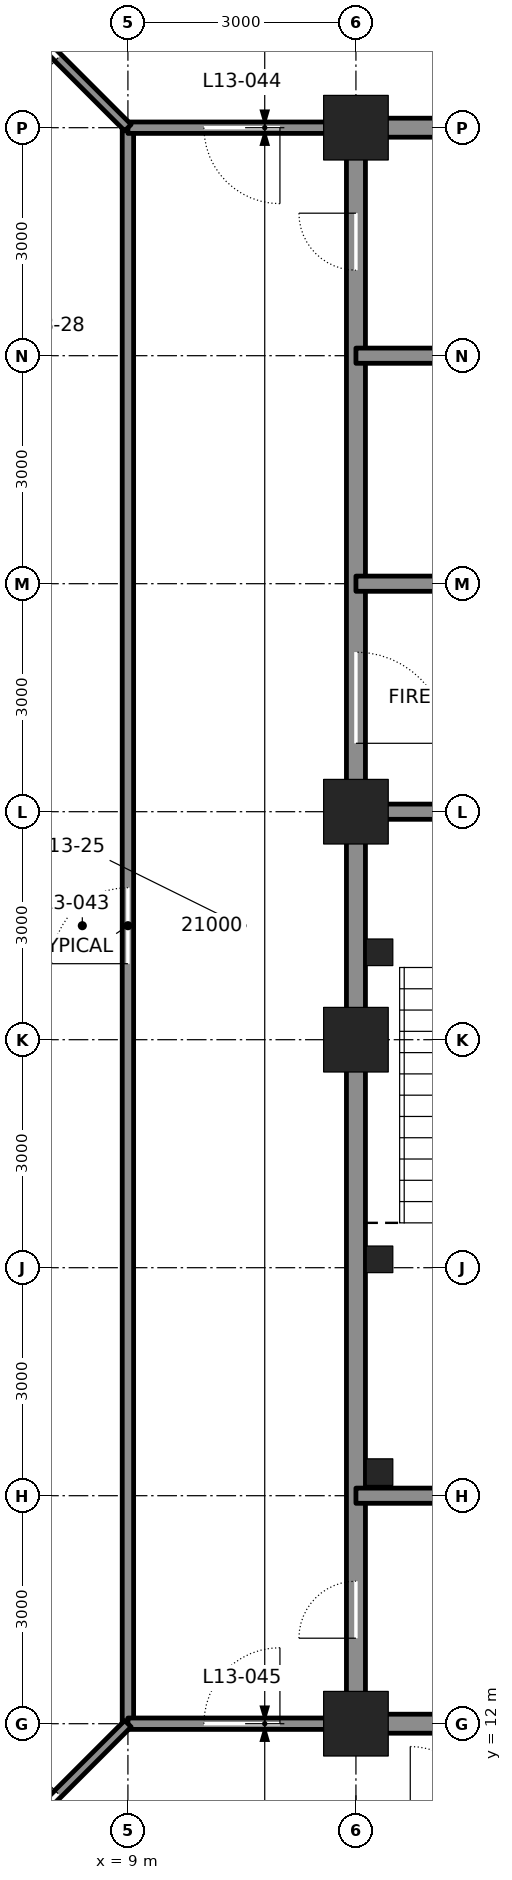
"""IFC4 building model, lengths in metres.
Left out: names, types, materials, properties, quantities, classifications, styles, units other than length and angle.
Written with IfcOpenShell. Run it as: python <this file> out.ifc"""

import sys

from ifc_helpers import new_model, si_unit, direction, frame, frame_2d, origin, origin_2d, place, context, subcontext, project, spatial, rectangle, hollow_rectangle, extrude, element, fill, save


model = new_model("IFC4")
c1 = context("Model", 3, precision=1e-05, world=origin(), true_north=direction((0.0, 1.0)))
c2 = subcontext(c1, "Body", "Model", "MODEL_VIEW")
j1 = project(units=[si_unit("LENGTHUNIT", "METRE"), si_unit("PLANEANGLEUNIT", "RADIAN")], contexts=[c1])
p1 = place(None, origin())
s1 = spatial("IfcSite", under=j1, at=p1, CompositionType="ELEMENT")
p2 = place(p1, origin())
s2 = spatial("IfcBuilding", under=s1, at=p2, CompositionType="ELEMENT")
p3 = place(p2, frame((0.0, 0.0, 64.8)))
s3 = spatial("IfcBuildingStorey", under=s2, at=p3, CompositionType="ELEMENT", Elevation=64.8)
for number, where, z_axis, x_axis in (
    (1, (12.0, 12.0, 0.0), (0.0, 0.0, 1.0), (1.0, 0.0, 0.0)),
    (2, (12.0, 33.0, 0.0), (0.0, 0.0, 1.0), (1.0, 0.0, 0.0)),
    (3, (12.0, 21.0, 0.0), (0.0, 0.0, 1.0), (1.0, 0.0, 0.0)),
    (4, (12.0, 24.0, 0.0), (0.0, 0.0, 1.0), (1.0, 0.0, 0.0)),
):
    element("IfcColumn", number, at=place(p3, frame(where, z_axis=z_axis, x_axis=x_axis)), inside=s3, PredefinedType="COLUMN", context=c2, shape_type="SweptSolid", body=[
        extrude(hollow_rectangle(XDim=0.85, YDim=0.85, WallThickness=0.085, at=origin_2d()), origin(), (0.0, 0.0, 1.0), 4.5),
    ])
p4 = place(p3, frame((12.0, 12.25, 0.0), z_axis=(0.0, 0.0, 1.0), x_axis=(0.0, 1.0, 0.0)))
e5 = element("IfcWall", 5, at=p4, inside=s3, PredefinedType="SOLIDWALL", context=c2, shape_type="SweptSolid", body=[
    extrude(rectangle(XDim=8.5, YDim=0.25, at=frame_2d((4.25, 0.0))), origin(), (0.0, 0.0, 1.0), 3.113),
])
p5 = place(p4, frame((0.875, 0.0, 0.0)))
e6 = element("IfcOpeningElement", 6, at=p5, cuts=e5, PredefinedType="OPENING", context=c2, shape_type="SweptSolid", body=[
    extrude(rectangle(XDim=0.75, YDim=2.1, at=frame_2d((0.375, 1.05))), frame((0.0, 0.135, 0.0), z_axis=(0.0, -1.0, 0.0), x_axis=(1.0, 0.0, 0.0)), (0.0, 0.0, 1.0), 0.27),
])
p6 = place(p3, frame((12.0, 21.25, 0.0), z_axis=(0.0, 0.0, 1.0), x_axis=(0.0, 1.0, 0.0)))
e7 = element("IfcWall", 7, at=p6, inside=s3, PredefinedType="SOLIDWALL", context=c2, shape_type="SweptSolid", body=[
    extrude(rectangle(XDim=2.5, YDim=0.25, at=frame_2d((1.25, 0.0))), origin(), (0.0, 0.0, 1.0), 3.113),
])
p7 = place(p3, frame((12.0, 24.25, 0.0), z_axis=(0.0, 0.0, 1.0), x_axis=(0.0, 1.0, 0.0)))
e8 = element("IfcWall", 8, at=p7, inside=s3, PredefinedType="SOLIDWALL", context=c2, shape_type="SweptSolid", body=[
    extrude(rectangle(XDim=8.5, YDim=0.25, at=frame_2d((4.25, 0.0))), origin(), (0.0, 0.0, 1.0), 3.113),
])
p8 = place(p7, frame((0.65, 0.0, 0.0)))
e9 = element("IfcOpeningElement", 9, at=p8, cuts=e8, PredefinedType="OPENING", context=c2, shape_type="SweptSolid", body=[
    extrude(rectangle(XDim=1.2, YDim=2.1, at=frame_2d((0.6, 1.05))), frame((0.0, 0.135, 0.0), z_axis=(0.0, -1.0, 0.0), x_axis=(1.0, 0.0, 0.0)), (0.0, 0.0, 1.0), 0.27),
])
p9 = place(p7, frame((6.875, 0.0, 0.0)))
e10 = element("IfcOpeningElement", 10, at=p9, cuts=e8, PredefinedType="OPENING", context=c2, shape_type="SweptSolid", body=[
    extrude(rectangle(XDim=0.75, YDim=2.1, at=frame_2d((0.375, 1.05))), frame((0.0, 0.135, 0.0), z_axis=(0.0, -1.0, 0.0), x_axis=(1.0, 0.0, 0.0)), (0.0, 0.0, 1.0), 0.27),
])
p10 = place(p3, frame((12.25, 12.0, 0.0), z_axis=(0.0, 0.0, 1.0), x_axis=(1.0, 0.0, 0.0)))
e11 = element("IfcWall", 11, at=p10, inside=s3, PredefinedType="SOLIDWALL", context=c2, shape_type="SweptSolid", body=[
    extrude(rectangle(XDim=4.0, YDim=0.25, at=frame_2d((2.0, 0.0))), origin(), (0.0, 0.0, 1.0), 3.181),
])
p11 = place(p3, frame((12.0, 15.0, 0.0), z_axis=(0.0, 0.0, 1.0), x_axis=(1.0, 0.0, 0.0)))
e12 = element("IfcWall", 12, at=p11, inside=s3, PredefinedType="SOLIDWALL", context=c2, shape_type="SweptSolid", body=[
    extrude(rectangle(XDim=7.5, YDim=0.2, at=frame_2d((3.75, 0.0))), origin(), (0.0, 0.0, 1.0), 4.34),
])
p12 = place(p3, frame((12.25, 24.0, 0.0), z_axis=(0.0, 0.0, 1.0), x_axis=(1.0, 0.0, 0.0)))
e13 = element("IfcWall", 13, at=p12, inside=s3, PredefinedType="SOLIDWALL", context=c2, shape_type="SweptSolid", body=[
    extrude(rectangle(XDim=4.0, YDim=0.2, at=frame_2d((2.0, 0.0))), origin(), (0.0, 0.0, 1.0), 3.39),
])
p13 = place(p12, frame((1.4, 0.0, 0.0)))
e14 = element("IfcOpeningElement", 14, at=p13, cuts=e13, PredefinedType="OPENING", context=c2, shape_type="SweptSolid", body=[
    extrude(rectangle(XDim=1.2, YDim=2.1, at=frame_2d((0.6, 1.05))), frame((0.0, 0.11, 0.0), z_axis=(0.0, -1.0, 0.0), x_axis=(1.0, 0.0, 0.0)), (0.0, 0.0, 1.0), 0.22),
])
p14 = place(p3, frame((12.0, 27.0, 0.0), z_axis=(0.0, 0.0, 1.0), x_axis=(1.0, 0.0, 0.0)))
e15 = element("IfcWall", 15, at=p14, inside=s3, PredefinedType="SOLIDWALL", context=c2, shape_type="SweptSolid", body=[
    extrude(rectangle(XDim=7.5, YDim=0.2, at=frame_2d((3.75, 0.0))), origin(), (0.0, 0.0, 1.0), 4.34),
])
p15 = place(p14, frame((1.65, 0.0, 0.0)))
e16 = element("IfcOpeningElement", 16, at=p15, cuts=e15, PredefinedType="OPENING", context=c2, shape_type="SweptSolid", body=[
    extrude(rectangle(XDim=1.2, YDim=2.1, at=frame_2d((0.6, 1.05))), frame((0.0, 0.11, 0.0), z_axis=(0.0, -1.0, 0.0), x_axis=(1.0, 0.0, 0.0)), (0.0, 0.0, 1.0), 0.22),
])
p16 = place(p3, frame((12.0, 30.0, 0.0), z_axis=(0.0, 0.0, 1.0), x_axis=(1.0, 0.0, 0.0)))
e17 = element("IfcWall", 17, at=p16, inside=s3, PredefinedType="SOLIDWALL", context=c2, shape_type="SweptSolid", body=[
    extrude(rectangle(XDim=4.5, YDim=0.2, at=frame_2d((2.25, 0.0))), origin(), (0.0, 0.0, 1.0), 4.34),
])
p17 = place(p3, frame((12.25, 33.0, 0.0), z_axis=(0.0, 0.0, 1.0), x_axis=(1.0, 0.0, 0.0)))
e18 = element("IfcWall", 18, at=p17, inside=s3, PredefinedType="SOLIDWALL", context=c2, shape_type="SweptSolid", body=[
    extrude(rectangle(XDim=4.0, YDim=0.25, at=frame_2d((2.0, 0.0))), origin(), (0.0, 0.0, 1.0), 3.181),
])
p18 = place(p3, frame((9.0, 12.0, -0.3), z_axis=(0.0, 0.0, 1.0), x_axis=(0.0, 1.0, 0.0)))
e19 = element("IfcWall", 19, at=p18, inside=s3, PredefinedType="PARTITIONING", context=c2, shape_type="SweptSolid", body=[
    extrude(rectangle(XDim=21.0, YDim=0.15, at=frame_2d((10.5, 0.0))), origin(), (0.0, 0.0, 1.0), 4.34),
])
p19 = place(p18, frame((10.0, 0.0, 0.3)))
e20 = element("IfcOpeningElement", 20, at=p19, cuts=e19, PredefinedType="OPENING", context=c2, shape_type="SweptSolid", body=[
    extrude(rectangle(XDim=1.0, YDim=2.4, at=frame_2d((0.5, 1.2))), frame((0.0, 0.085, 0.0), z_axis=(0.0, -1.0, 0.0), x_axis=(1.0, 0.0, 0.0)), (0.0, 0.0, 1.0), 0.17),
])
p20 = place(p3, frame((9.0, 33.0, -0.3), z_axis=(0.0, 0.0, 1.0), x_axis=(1.0, 0.0, 0.0)))
e21 = element("IfcWall", 21, at=p20, inside=s3, PredefinedType="PARTITIONING", context=c2, shape_type="SweptSolid", body=[
    extrude(rectangle(XDim=3.0, YDim=0.15, at=frame_2d((1.5, 0.0))), origin(), (0.0, 0.0, 1.0), 3.481),
])
p21 = place(p20, frame((1.0, 0.0, 0.3)))
e22 = element("IfcOpeningElement", 22, at=p21, cuts=e21, PredefinedType="OPENING", context=c2, shape_type="SweptSolid", body=[
    extrude(rectangle(XDim=1.0, YDim=2.4, at=frame_2d((0.5, 1.2))), frame((0.0, 0.085, 0.0), z_axis=(0.0, -1.0, 0.0), x_axis=(1.0, 0.0, 0.0)), (0.0, 0.0, 1.0), 0.17),
])
p22 = place(p3, frame((9.0, 12.0, -0.3), z_axis=(0.0, 0.0, 1.0), x_axis=(1.0, 0.0, 0.0)))
e23 = element("IfcWall", 23, at=p22, inside=s3, PredefinedType="PARTITIONING", context=c2, shape_type="SweptSolid", body=[
    extrude(rectangle(XDim=3.0, YDim=0.15, at=frame_2d((1.5, 0.0))), origin(), (0.0, 0.0, 1.0), 3.481),
])
p23 = place(p22, frame((1.0, 0.0, 0.3)))
e24 = element("IfcOpeningElement", 24, at=p23, cuts=e23, PredefinedType="OPENING", context=c2, shape_type="SweptSolid", body=[
    extrude(rectangle(XDim=1.0, YDim=2.4, at=frame_2d((0.5, 1.2))), frame((0.0, 0.085, 0.0), z_axis=(0.0, -1.0, 0.0), x_axis=(1.0, 0.0, 0.0)), (0.0, 0.0, 1.0), 0.17),
])
p24 = place(p3, frame((9.0, 33.0, -0.3), z_axis=(0.0, 0.0, 1.0), x_axis=(-0.707106781187, 0.707106781187, 0.0)))
e25 = element("IfcWall", 25, at=p24, inside=s3, PredefinedType="PARTITIONING", context=c2, shape_type="SweptSolid", body=[
    extrude(rectangle(XDim=11.842, YDim=0.12, at=frame_2d((5.921, 0.0))), origin(), (0.0, 0.0, 1.0), 4.34),
])
p25 = place(p24, frame((1.3, 0.0, 0.3)))
e26 = element("IfcOpeningElement", 26, at=p25, cuts=e25, PredefinedType="OPENING", context=c2, shape_type="SweptSolid", body=[
    extrude(rectangle(XDim=1.0, YDim=2.4, at=frame_2d((0.5, 1.2))), frame((0.0, 0.07, 0.0), z_axis=(0.0, -1.0, 0.0), x_axis=(1.0, 0.0, 0.0)), (0.0, 0.0, 1.0), 0.14),
])
p26 = place(p3, frame((9.0, 12.0, -0.3), z_axis=(0.0, 0.0, 1.0), x_axis=(-0.707106781187, -0.707106781187, 0.0)))
e27 = element("IfcWall", 27, at=p26, inside=s3, PredefinedType="PARTITIONING", context=c2, shape_type="SweptSolid", body=[
    extrude(rectangle(XDim=11.842, YDim=0.12, at=frame_2d((5.921, 0.0))), origin(), (0.0, 0.0, 1.0), 4.34),
])
p27 = place(p26, frame((1.3, 0.0, 0.3)))
e28 = element("IfcOpeningElement", 28, at=p27, cuts=e27, PredefinedType="OPENING", context=c2, shape_type="SweptSolid", body=[
    extrude(rectangle(XDim=1.0, YDim=2.4, at=frame_2d((0.5, 1.2))), frame((0.0, 0.07, 0.0), z_axis=(0.0, -1.0, 0.0), x_axis=(1.0, 0.0, 0.0)), (0.0, 0.0, 1.0), 0.14),
])
for number, where, z_axis, x_axis in (
    (29, (12.31, 15.31, 0.0), (0.0, 0.0, 1.0), (1.0, 0.0, 0.0)),
    (30, (12.31, 18.11, 0.0), (0.0, 0.0, 1.0), (1.0, 0.0, 0.0)),
    (31, (12.31, 22.15, 0.0), (0.0, 0.0, 1.0), (1.0, 0.0, 0.0)),
):
    element("IfcColumn", number, at=place(p3, frame(where, z_axis=z_axis, x_axis=x_axis)), inside=s3, PredefinedType="COLUMN", context=c2, shape_type="SweptSolid", body=[
        extrude(hollow_rectangle(XDim=0.35, YDim=0.35, WallThickness=0.035, at=origin_2d()), origin(), (0.0, 0.0, 1.0), 4.5),
    ])
p28 = place(p8, frame((1.2, 0.0, 0.0), z_axis=(0.0, 0.0, 1.0), x_axis=(-1.0, 0.0, 0.0)))
e32 = element("IfcDoor", 32, at=p28, inside=s3, OperationType="SINGLE_SWING_RIGHT", PredefinedType="DOOR", context=c2, shape_type="SweptSolid", body=[
    extrude(rectangle(XDim=1.2, YDim=2.1, at=frame_2d((0.6, 1.05))), frame((0.0, 0.025, 0.0), z_axis=(0.0, -1.0, 0.0), x_axis=(1.0, 0.0, 0.0)), (0.0, 0.0, 1.0), 0.05),
])
fill(e9, e32)
p29 = place(p5, origin())
e33 = element("IfcDoor", 33, at=p29, inside=s3, OperationType="SINGLE_SWING_LEFT", PredefinedType="DOOR", context=c2, shape_type="SweptSolid", body=[
    extrude(rectangle(XDim=0.75, YDim=2.1, at=frame_2d((0.375, 1.05))), frame((0.0, 0.025, 0.0), z_axis=(0.0, -1.0, 0.0), x_axis=(1.0, 0.0, 0.0)), (0.0, 0.0, 1.0), 0.05),
])
fill(e6, e33)
p30 = place(p9, origin())
e34 = element("IfcDoor", 34, at=p30, inside=s3, OperationType="SINGLE_SWING_RIGHT", PredefinedType="DOOR", context=c2, shape_type="SweptSolid", body=[
    extrude(rectangle(XDim=0.75, YDim=2.1, at=frame_2d((0.375, 1.05))), frame((0.0, 0.025, 0.0), z_axis=(0.0, -1.0, 0.0), x_axis=(1.0, 0.0, 0.0)), (0.0, 0.0, 1.0), 0.05),
])
fill(e10, e34)
p31 = place(p19, origin())
e35 = element("IfcDoor", 35, at=p31, inside=s3, OperationType="SINGLE_SWING_LEFT", PredefinedType="DOOR", context=c2, shape_type="SweptSolid", body=[
    extrude(rectangle(XDim=1.0, YDim=2.4, at=frame_2d((0.5, 1.2))), frame((0.0, 0.025, 0.0), z_axis=(0.0, -1.0, 0.0), x_axis=(1.0, 0.0, 0.0)), (0.0, 0.0, 1.0), 0.05),
])
fill(e20, e35)
p32 = place(p21, frame((1.0, 0.0, 0.0), z_axis=(0.0, 0.0, 1.0), x_axis=(-1.0, 0.0, 0.0)))
e36 = element("IfcDoor", 36, at=p32, inside=s3, OperationType="SINGLE_SWING_LEFT", PredefinedType="DOOR", context=c2, shape_type="SweptSolid", body=[
    extrude(rectangle(XDim=1.0, YDim=2.4, at=frame_2d((0.5, 1.2))), frame((0.0, 0.025, 0.0), z_axis=(0.0, -1.0, 0.0), x_axis=(1.0, 0.0, 0.0)), (0.0, 0.0, 1.0), 0.05),
])
fill(e22, e36)
p33 = place(p23, origin())
e37 = element("IfcDoor", 37, at=p33, inside=s3, OperationType="SINGLE_SWING_RIGHT", PredefinedType="DOOR", context=c2, shape_type="SweptSolid", body=[
    extrude(rectangle(XDim=1.0, YDim=2.4, at=frame_2d((0.5, 1.2))), frame((0.0, 0.025, 0.0), z_axis=(0.0, -1.0, 0.0), x_axis=(1.0, 0.0, 0.0)), (0.0, 0.0, 1.0), 0.05),
])
fill(e24, e37)
p34 = place(p25, origin())
e38 = element("IfcDoor", 38, at=p34, inside=s3, OperationType="SINGLE_SWING_LEFT", PredefinedType="DOOR", context=c2, shape_type="SweptSolid", body=[
    extrude(rectangle(XDim=1.0, YDim=2.4, at=frame_2d((0.5, 1.2))), frame((0.0, 0.025, 0.0), z_axis=(0.0, -1.0, 0.0), x_axis=(1.0, 0.0, 0.0)), (0.0, 0.0, 1.0), 0.05),
])
fill(e26, e38)
p35 = place(p27, frame((1.0, 0.0, 0.0), z_axis=(0.0, 0.0, 1.0), x_axis=(-1.0, 0.0, 0.0)))
e39 = element("IfcDoor", 39, at=p35, inside=s3, OperationType="SINGLE_SWING_RIGHT", PredefinedType="DOOR", context=c2, shape_type="SweptSolid", body=[
    extrude(rectangle(XDim=1.0, YDim=2.4, at=frame_2d((0.5, 1.2))), frame((0.0, 0.025, 0.0), z_axis=(0.0, -1.0, 0.0), x_axis=(1.0, 0.0, 0.0)), (0.0, 0.0, 1.0), 0.05),
])
fill(e28, e39)
save(model, sys.argv[1])
